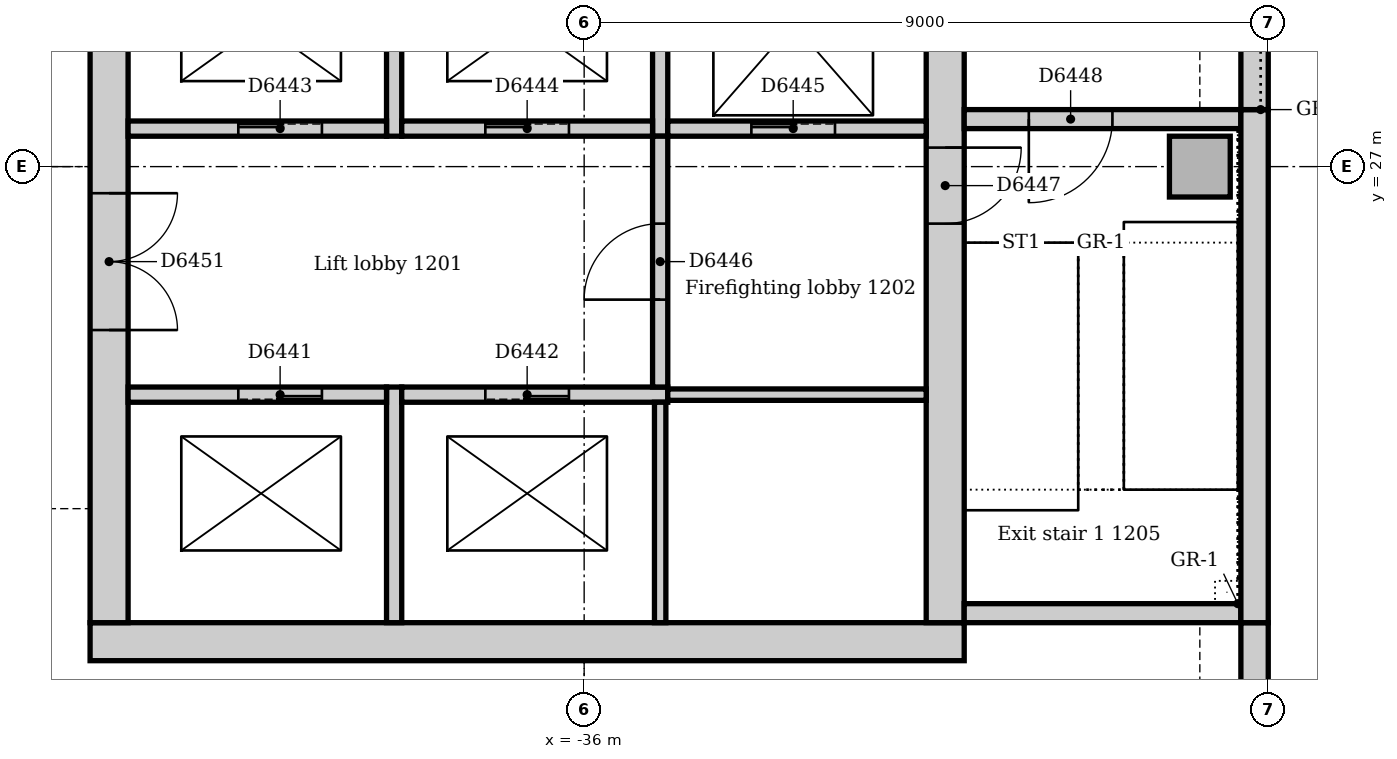
"""IFC4 building model, lengths in metres.
Left out: names, types, materials, properties, quantities, classifications, styles, units other than length and angle.
Written with IfcOpenShell. Run it as: python <this file> out.ifc"""

import sys

from ifc_helpers import new_model, si_unit, direction, frame, frame_2d, origin, origin_2d, place, context, subcontext, project, spatial, rectangle, extrude, element, fill, save


model = new_model("IFC4")
c1 = context("Model", 3, precision=1e-05, world=origin(), true_north=direction((0.0, 1.0)))
c2 = subcontext(c1, "Body", "Model", "MODEL_VIEW")
j1 = project(units=[si_unit("LENGTHUNIT", "METRE"), si_unit("PLANEANGLEUNIT", "RADIAN")], contexts=[c1])
p1 = place(None, origin())
s1 = spatial("IfcSite", under=j1, at=p1, CompositionType="ELEMENT")
p2 = place(p1, origin())
s2 = spatial("IfcBuilding", under=s1, at=p2, CompositionType="ELEMENT")
p3 = place(p2, frame((0.0, 0.0, 55.0)))
s3 = spatial("IfcBuildingStorey", under=s2, at=p3, CompositionType="ELEMENT", Elevation=55.0)
p4 = place(p3, frame((-42.5, 20.75, 0.0), z_axis=(0.0, 0.0, 1.0), x_axis=(1.0, 0.0, 0.0)))
e1 = element("IfcWall", 1, at=p4, inside=s3, PredefinedType="SOLIDWALL", context=c2, shape_type="SweptSolid", body=[
    extrude(rectangle(XDim=11.5, YDim=0.5, at=frame_2d((5.75, 0.0))), origin(), (0.0, 0.0, 1.0), 4.0),
])
p5 = place(p3, frame((-31.25, 21.0, 0.0), z_axis=(0.0, 0.0, 1.0), x_axis=(0.0, 1.0, 0.0)))
e2 = element("IfcWall", 2, at=p5, inside=s3, PredefinedType="SOLIDWALL", context=c2, shape_type="SweptSolid", body=[
    extrude(rectangle(XDim=9.5, YDim=0.5, at=frame_2d((4.75, 0.0))), origin(), (0.0, 0.0, 1.0), 4.0),
])
p6 = place(p5, frame((5.25, 0.0, 0.0)))
e3 = element("IfcOpeningElement", 3, at=p6, cuts=e2, PredefinedType="OPENING", context=c2, shape_type="SweptSolid", body=[
    extrude(rectangle(XDim=1.0, YDim=2.1, at=frame_2d((0.5, 1.05))), frame((0.0, 0.26, 0.0), z_axis=(0.0, -1.0, 0.0), x_axis=(1.0, 0.0, 0.0)), (0.0, 0.0, 1.0), 0.52),
])
p7 = place(p3, frame((-42.25, 30.5, 0.0), z_axis=(0.0, 0.0, 1.0), x_axis=(0.0, -1.0, 0.0)))
e4 = element("IfcWall", 4, at=p7, inside=s3, PredefinedType="SOLIDWALL", context=c2, shape_type="SweptSolid", body=[
    extrude(rectangle(XDim=9.5, YDim=0.5, at=frame_2d((4.75, 0.0))), origin(), (0.0, 0.0, 1.0), 4.0),
])
p8 = place(p7, frame((3.85, 0.0, 0.0)))
e5 = element("IfcOpeningElement", 5, at=p8, cuts=e4, PredefinedType="OPENING", context=c2, shape_type="SweptSolid", body=[
    extrude(rectangle(XDim=1.8, YDim=2.1, at=frame_2d((0.9, 1.05))), frame((0.0, 0.26, 0.0), z_axis=(0.0, -1.0, 0.0), x_axis=(1.0, 0.0, 0.0)), (0.0, 0.0, 1.0), 0.52),
])
p9 = place(p3, frame((-31.0, 21.125, 0.0), z_axis=(0.0, 0.0, 1.0), x_axis=(1.0, 0.0, 0.0)))
e6 = element("IfcWall", 6, at=p9, inside=s3, PredefinedType="SOLIDWALL", context=c2, shape_type="SweptSolid", body=[
    extrude(rectangle(XDim=3.64, YDim=0.25, at=frame_2d((1.82, 0.0))), origin(), (0.0, 0.0, 1.0), 4.0),
])
p10 = place(p3, frame((-27.36, 27.625, 0.0), z_axis=(0.0, 0.0, 1.0), x_axis=(-1.0, 0.0, 0.0)))
e7 = element("IfcWall", 7, at=p10, inside=s3, PredefinedType="SOLIDWALL", context=c2, shape_type="SweptSolid", body=[
    extrude(rectangle(XDim=3.64, YDim=0.25, at=frame_2d((1.82, 0.0))), origin(), (0.0, 0.0, 1.0), 4.0),
])
p11 = place(p10, frame((1.69, 0.0, 0.0)))
e8 = element("IfcOpeningElement", 8, at=p11, cuts=e7, PredefinedType="OPENING", context=c2, shape_type="SweptSolid", body=[
    extrude(rectangle(XDim=1.1, YDim=2.1, at=frame_2d((0.55, 1.05))), frame((0.0, 0.135, 0.0), z_axis=(0.0, -1.0, 0.0), x_axis=(1.0, 0.0, 0.0)), (0.0, 0.0, 1.0), 0.27),
])
p12 = place(p3, frame((-27.9, 27.0, 0.0), z_axis=(0.0, 0.0, 1.0), x_axis=(1.0, 0.0, 0.0)))
e9 = element("IfcColumn", 9, at=p12, inside=s3, PredefinedType="COLUMN", context=c2, shape_type="SweptSolid", body=[
    extrude(rectangle(XDim=0.8, YDim=0.8, at=origin_2d()), origin(), (0.0, 0.0, 1.0), 4.0),
])
p13 = place(p3, frame((-27.18, 13.243, 0.0), z_axis=(0.0, 0.0, 1.0), x_axis=(0.0, 1.0, 0.0)))
e10 = element("IfcWall", 10, at=p13, inside=s3, PredefinedType="STANDARD", context=c2, shape_type="SweptSolid", body=[
    extrude(rectangle(XDim=7.757, YDim=0.36, at=frame_2d((3.879, 0.0))), origin(), (0.0, 0.0, 1.0), 3.85),
])
p14 = place(p13, frame((1.982, 0.0, 0.9)))
e11 = element("IfcOpeningElement", 11, at=p14, cuts=e10, PredefinedType="OPENING", context=c2, shape_type="SweptSolid", body=[
    extrude(rectangle(XDim=3.3, YDim=1.6, at=frame_2d((1.65, 0.8))), frame((0.0, 0.19, 0.0), z_axis=(0.0, -1.0, 0.0), x_axis=(1.0, 0.0, 0.0)), (0.0, 0.0, 1.0), 0.38),
])
p15 = place(p3, frame((-27.18, 21.0, 0.0), z_axis=(0.0, 0.0, 1.0), x_axis=(0.0, 1.0, 0.0)))
e12 = element("IfcWall", 12, at=p15, inside=s3, PredefinedType="STANDARD", context=c2, shape_type="SweptSolid", body=[
    extrude(rectangle(XDim=6.75, YDim=0.36, at=frame_2d((3.375, 0.0))), origin(), (0.0, 0.0, 1.0), 3.85),
])
p16 = place(p3, frame((-27.18, 27.75, 0.0), z_axis=(0.0, 0.0, 1.0), x_axis=(0.0, 1.0, 0.0)))
e13 = element("IfcWall", 13, at=p16, inside=s3, PredefinedType="STANDARD", context=c2, shape_type="SweptSolid", body=[
    extrude(rectangle(XDim=7.5, YDim=0.36, at=frame_2d((3.75, 0.0))), origin(), (0.0, 0.0, 1.0), 3.85),
])
p17 = place(p16, frame((2.85, 0.0, 1.2)))
e14 = element("IfcOpeningElement", 14, at=p17, cuts=e13, PredefinedType="OPENING", context=c2, shape_type="SweptSolid", body=[
    extrude(rectangle(XDim=1.8, YDim=1.2, at=frame_2d((0.9, 0.6))), frame((0.0, 0.19, 0.0), z_axis=(0.0, -1.0, 0.0), x_axis=(1.0, 0.0, 0.0)), (0.0, 0.0, 1.0), 0.38),
])
p18 = place(p3, frame((-38.5, 21.0, 0.0), z_axis=(0.0, 0.0, 1.0), x_axis=(0.0, 1.0, 0.0)))
e15 = element("IfcWall", 15, at=p18, inside=s3, PredefinedType="SOLIDWALL", context=c2, shape_type="SweptSolid", body=[
    extrude(rectangle(XDim=3.1, YDim=0.2, at=frame_2d((1.55, 0.0))), origin(), (0.0, 0.0, 1.0), 4.0),
])
p19 = place(p3, frame((-38.6, 24.0, 0.0), z_axis=(0.0, 0.0, 1.0), x_axis=(-1.0, 0.0, 0.0)))
e16 = element("IfcWall", 16, at=p19, inside=s3, PredefinedType="SOLIDWALL", context=c2, shape_type="SweptSolid", body=[
    extrude(rectangle(XDim=3.4, YDim=0.2, at=frame_2d((1.7, 0.0))), origin(), (0.0, 0.0, 1.0), 4.0),
])
p20 = place(p19, frame((0.85, 0.0, 0.0)))
e17 = element("IfcOpeningElement", 17, at=p20, cuts=e16, PredefinedType="OPENING", context=c2, shape_type="SweptSolid", body=[
    extrude(rectangle(XDim=1.1, YDim=2.1, at=frame_2d((0.55, 1.05))), frame((0.0, 0.11, 0.0), z_axis=(0.0, -1.0, 0.0), x_axis=(1.0, 0.0, 0.0)), (0.0, 0.0, 1.0), 0.22),
])
p21 = place(p3, frame((-34.9, 24.0, 0.0), z_axis=(0.0, 0.0, 1.0), x_axis=(-1.0, 0.0, 0.0)))
e18 = element("IfcWall", 18, at=p21, inside=s3, PredefinedType="SOLIDWALL", context=c2, shape_type="SweptSolid", body=[
    extrude(rectangle(XDim=3.5, YDim=0.2, at=frame_2d((1.75, 0.0))), origin(), (0.0, 0.0, 1.0), 4.0),
])
p22 = place(p21, frame((1.3, 0.0, 0.0)))
e19 = element("IfcOpeningElement", 19, at=p22, cuts=e18, PredefinedType="OPENING", context=c2, shape_type="SweptSolid", body=[
    extrude(rectangle(XDim=1.1, YDim=2.1, at=frame_2d((0.55, 1.05))), frame((0.0, 0.11, 0.0), z_axis=(0.0, -1.0, 0.0), x_axis=(1.0, 0.0, 0.0)), (0.0, 0.0, 1.0), 0.22),
])
p23 = place(p3, frame((-38.5, 27.4, 0.0), z_axis=(0.0, 0.0, 1.0), x_axis=(0.0, 1.0, 0.0)))
e20 = element("IfcWall", 20, at=p23, inside=s3, PredefinedType="SOLIDWALL", context=c2, shape_type="SweptSolid", body=[
    extrude(rectangle(XDim=2.85, YDim=0.2, at=frame_2d((1.425, 0.0))), origin(), (0.0, 0.0, 1.0), 4.0),
])
p24 = place(p3, frame((-42.0, 27.5, 0.0), z_axis=(0.0, 0.0, 1.0), x_axis=(1.0, 0.0, 0.0)))
e21 = element("IfcWall", 21, at=p24, inside=s3, PredefinedType="SOLIDWALL", context=c2, shape_type="SweptSolid", body=[
    extrude(rectangle(XDim=3.4, YDim=0.2, at=frame_2d((1.7, 0.0))), origin(), (0.0, 0.0, 1.0), 4.0),
])
p25 = place(p24, frame((1.45, 0.0, 0.0)))
e22 = element("IfcOpeningElement", 22, at=p25, cuts=e21, PredefinedType="OPENING", context=c2, shape_type="SweptSolid", body=[
    extrude(rectangle(XDim=1.1, YDim=2.1, at=frame_2d((0.55, 1.05))), frame((0.0, 0.11, 0.0), z_axis=(0.0, -1.0, 0.0), x_axis=(1.0, 0.0, 0.0)), (0.0, 0.0, 1.0), 0.22),
])
p26 = place(p3, frame((-35.0, 27.4, 0.0), z_axis=(0.0, 0.0, 1.0), x_axis=(0.0, 1.0, 0.0)))
e23 = element("IfcWall", 23, at=p26, inside=s3, PredefinedType="SOLIDWALL", context=c2, shape_type="SweptSolid", body=[
    extrude(rectangle(XDim=2.85, YDim=0.2, at=frame_2d((1.425, 0.0))), origin(), (0.0, 0.0, 1.0), 4.0),
])
p27 = place(p3, frame((-38.4, 27.5, 0.0), z_axis=(0.0, 0.0, 1.0), x_axis=(1.0, 0.0, 0.0)))
e24 = element("IfcWall", 24, at=p27, inside=s3, PredefinedType="SOLIDWALL", context=c2, shape_type="SweptSolid", body=[
    extrude(rectangle(XDim=3.3, YDim=0.2, at=frame_2d((1.65, 0.0))), origin(), (0.0, 0.0, 1.0), 4.0),
])
p28 = place(p27, frame((1.1, 0.0, 0.0)))
e25 = element("IfcOpeningElement", 25, at=p28, cuts=e24, PredefinedType="OPENING", context=c2, shape_type="SweptSolid", body=[
    extrude(rectangle(XDim=1.1, YDim=2.1, at=frame_2d((0.55, 1.05))), frame((0.0, 0.11, 0.0), z_axis=(0.0, -1.0, 0.0), x_axis=(1.0, 0.0, 0.0)), (0.0, 0.0, 1.0), 0.22),
])
p29 = place(p3, frame((-34.9, 27.5, 0.0), z_axis=(0.0, 0.0, 1.0), x_axis=(1.0, 0.0, 0.0)))
e26 = element("IfcWall", 26, at=p29, inside=s3, PredefinedType="SOLIDWALL", context=c2, shape_type="SweptSolid", body=[
    extrude(rectangle(XDim=3.4, YDim=0.2, at=frame_2d((1.7, 0.0))), origin(), (0.0, 0.0, 1.0), 4.0),
])
p30 = place(p29, frame((1.1, 0.0, 0.0)))
e27 = element("IfcOpeningElement", 27, at=p30, cuts=e26, PredefinedType="OPENING", context=c2, shape_type="SweptSolid", body=[
    extrude(rectangle(XDim=1.1, YDim=2.1, at=frame_2d((0.55, 1.05))), frame((0.0, 0.11, 0.0), z_axis=(0.0, -1.0, 0.0), x_axis=(1.0, 0.0, 0.0)), (0.0, 0.0, 1.0), 0.22),
])
p31 = place(p3, frame((-35.0, 24.1, 0.0), z_axis=(0.0, 0.0, 1.0), x_axis=(0.0, 1.0, 0.0)))
e28 = element("IfcWall", 28, at=p31, inside=s3, PredefinedType="SOLIDWALL", context=c2, shape_type="SweptSolid", body=[
    extrude(rectangle(XDim=3.3, YDim=0.2, at=frame_2d((1.65, 0.0))), origin(), (0.0, 0.0, 1.0), 4.0),
])
p32 = place(p31, frame((1.15, 0.0, 0.0)))
e29 = element("IfcOpeningElement", 29, at=p32, cuts=e28, PredefinedType="OPENING", context=c2, shape_type="SweptSolid", body=[
    extrude(rectangle(XDim=1.0, YDim=2.1, at=frame_2d((0.5, 1.05))), frame((0.0, 0.11, 0.0), z_axis=(0.0, -1.0, 0.0), x_axis=(1.0, 0.0, 0.0)), (0.0, 0.0, 1.0), 0.22),
])
p33 = place(p3, frame((-35.0, 21.0, 0.0), z_axis=(0.0, 0.0, 1.0), x_axis=(0.0, 1.0, 0.0)))
e30 = element("IfcWall", 30, at=p33, inside=s3, PredefinedType="SOLIDWALL", context=c2, shape_type="SweptSolid", body=[
    extrude(rectangle(XDim=2.9, YDim=0.15, at=frame_2d((1.45, 0.0))), origin(), (0.0, 0.0, 1.0), 4.0),
])
p34 = place(p3, frame((-31.5, 24.0, 0.0), z_axis=(0.0, 0.0, 1.0), x_axis=(-1.0, 0.0, 0.0)))
e31 = element("IfcWall", 31, at=p34, inside=s3, PredefinedType="SOLIDWALL", context=c2, shape_type="SweptSolid", body=[
    extrude(rectangle(XDim=3.4, YDim=0.15, at=frame_2d((1.7, 0.0))), origin(), (0.0, 0.0, 1.0), 4.0),
])
p35 = place(p20, origin())
e32 = element("IfcDoor", 32, at=p35, inside=s3, OperationType="SLIDING_TO_LEFT", PredefinedType="DOOR", context=c2, shape_type="SweptSolid", body=[
    extrude(rectangle(XDim=1.1, YDim=2.1, at=frame_2d((0.55, 1.05))), frame((0.0, 0.025, 0.0), z_axis=(0.0, -1.0, 0.0), x_axis=(1.0, 0.0, 0.0)), (0.0, 0.0, 1.0), 0.05),
])
fill(e17, e32)
p36 = place(p22, origin())
e33 = element("IfcDoor", 33, at=p36, inside=s3, OperationType="SLIDING_TO_LEFT", PredefinedType="DOOR", context=c2, shape_type="SweptSolid", body=[
    extrude(rectangle(XDim=1.1, YDim=2.1, at=frame_2d((0.55, 1.05))), frame((0.0, 0.025, 0.0), z_axis=(0.0, -1.0, 0.0), x_axis=(1.0, 0.0, 0.0)), (0.0, 0.0, 1.0), 0.05),
])
fill(e19, e33)
p37 = place(p25, origin())
e34 = element("IfcDoor", 34, at=p37, inside=s3, OperationType="SLIDING_TO_LEFT", PredefinedType="DOOR", context=c2, shape_type="SweptSolid", body=[
    extrude(rectangle(XDim=1.1, YDim=2.1, at=frame_2d((0.55, 1.05))), frame((0.0, 0.025, 0.0), z_axis=(0.0, -1.0, 0.0), x_axis=(1.0, 0.0, 0.0)), (0.0, 0.0, 1.0), 0.05),
])
fill(e22, e34)
p38 = place(p28, origin())
e35 = element("IfcDoor", 35, at=p38, inside=s3, OperationType="SLIDING_TO_LEFT", PredefinedType="DOOR", context=c2, shape_type="SweptSolid", body=[
    extrude(rectangle(XDim=1.1, YDim=2.1, at=frame_2d((0.55, 1.05))), frame((0.0, 0.025, 0.0), z_axis=(0.0, -1.0, 0.0), x_axis=(1.0, 0.0, 0.0)), (0.0, 0.0, 1.0), 0.05),
])
fill(e25, e35)
p39 = place(p30, origin())
e36 = element("IfcDoor", 36, at=p39, inside=s3, OperationType="SLIDING_TO_LEFT", PredefinedType="DOOR", context=c2, shape_type="SweptSolid", body=[
    extrude(rectangle(XDim=1.1, YDim=2.1, at=frame_2d((0.55, 1.05))), frame((0.0, 0.025, 0.0), z_axis=(0.0, -1.0, 0.0), x_axis=(1.0, 0.0, 0.0)), (0.0, 0.0, 1.0), 0.05),
])
fill(e27, e36)
p40 = place(p32, origin())
e37 = element("IfcDoor", 37, at=p40, inside=s3, OperationType="SINGLE_SWING_LEFT", PredefinedType="DOOR", context=c2, shape_type="SweptSolid", body=[
    extrude(rectangle(XDim=1.0, YDim=2.1, at=frame_2d((0.5, 1.05))), frame((0.0, 0.025, 0.0), z_axis=(0.0, -1.0, 0.0), x_axis=(1.0, 0.0, 0.0)), (0.0, 0.0, 1.0), 0.05),
])
fill(e29, e37)
p41 = place(p6, frame((1.0, 0.0, 0.0), z_axis=(0.0, 0.0, 1.0), x_axis=(-1.0, 0.0, 0.0)))
e38 = element("IfcDoor", 38, at=p41, inside=s3, OperationType="SINGLE_SWING_LEFT", PredefinedType="DOOR", context=c2, shape_type="SweptSolid", body=[
    extrude(rectangle(XDim=1.0, YDim=2.1, at=frame_2d((0.5, 1.05))), frame((0.0, 0.025, 0.0), z_axis=(0.0, -1.0, 0.0), x_axis=(1.0, 0.0, 0.0)), (0.0, 0.0, 1.0), 0.05),
])
fill(e3, e38)
p42 = place(p11, origin())
e39 = element("IfcDoor", 39, at=p42, inside=s3, OperationType="SINGLE_SWING_RIGHT", PredefinedType="DOOR", context=c2, shape_type="SweptSolid", body=[
    extrude(rectangle(XDim=1.1, YDim=2.1, at=frame_2d((0.55, 1.05))), frame((0.0, 0.025, 0.0), z_axis=(0.0, -1.0, 0.0), x_axis=(1.0, 0.0, 0.0)), (0.0, 0.0, 1.0), 0.05),
])
fill(e8, e39)
p43 = place(p8, origin())
e40 = element("IfcDoor", 40, at=p43, inside=s3, OperationType="DOUBLE_DOOR_SINGLE_SWING", PredefinedType="DOOR", context=c2, shape_type="SweptSolid", body=[
    extrude(rectangle(XDim=1.8, YDim=2.1, at=frame_2d((0.9, 1.05))), frame((0.0, 0.025, 0.0), z_axis=(0.0, -1.0, 0.0), x_axis=(1.0, 0.0, 0.0)), (0.0, 0.0, 1.0), 0.05),
])
fill(e5, e40)
save(model, sys.argv[1])
